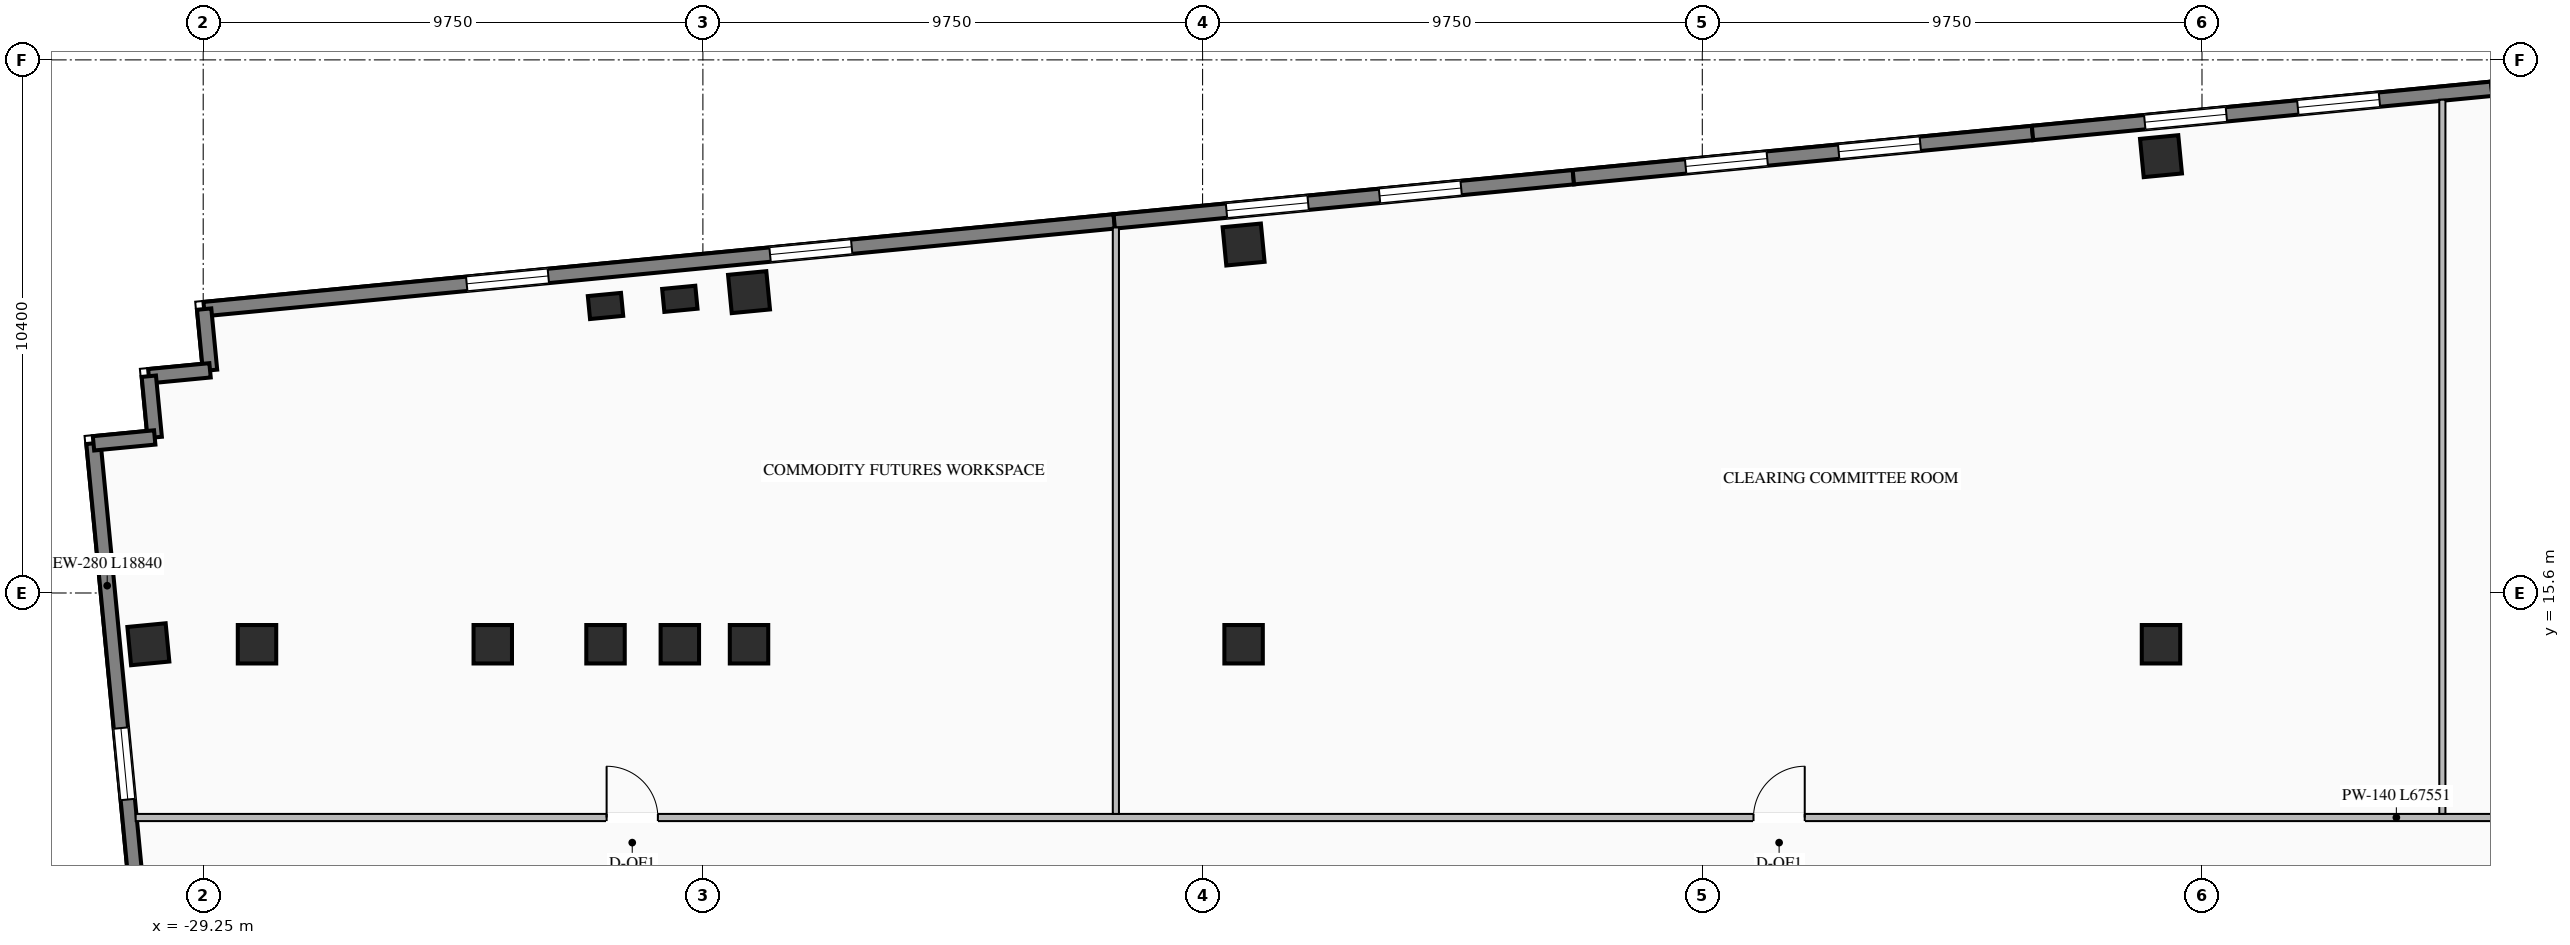
"""IFC4 building model, lengths in metres.
Left out: names, types, materials, properties, quantities, classifications, styles, units other than length and angle.
Written with IfcOpenShell. Run it as: python <this file> out.ifc"""

import sys

from ifc_helpers import new_model, si_unit, direction, frame, frame_2d, origin, origin_2d, place, context, subcontext, project, spatial, rectangle, i_section, extrude, element, fill, save


model = new_model("IFC4")
c1 = context("Model", 3, precision=1e-05, world=origin(), true_north=direction((0.0, 1.0)))
c2 = subcontext(c1, "Body", "Model", "MODEL_VIEW")
j1 = project(units=[si_unit("LENGTHUNIT", "METRE"), si_unit("PLANEANGLEUNIT", "RADIAN")], contexts=[c1])
p1 = place(None, origin())
s1 = spatial("IfcSite", under=j1, at=p1, CompositionType="ELEMENT")
p2 = place(p1, origin())
s2 = spatial("IfcBuilding", under=s1, at=p2, CompositionType="ELEMENT")
p3 = place(p2, frame((0.0, 0.0, 74.2)))
s3 = spatial("IfcBuildingStorey", under=s2, at=p3, CompositionType="ELEMENT", Elevation=74.2)
for number, where, z_axis, x_axis in (
    (1, (-21.4, 14.6, 0.0), (0.0, 0.0, 1.0), (1.0, 0.0, 0.0)),
    (2, (-19.95, 14.6, 0.0), (0.0, 0.0, 1.0), (1.0, 0.0, 0.0)),
    (3, (-18.6, 14.6, 0.0), (0.0, 0.0, 1.0), (1.0, 0.0, 0.0)),
    (4, (-8.95, 14.6, 0.0), (0.0, 0.0, 1.0), (1.0, 0.0, 0.0)),
    (5, (8.95, 14.6, 0.0), (0.0, 0.0, 1.0), (1.0, 0.0, 0.0)),
    (6, (-23.6, 14.6, 0.0), (0.0, 0.0, 1.0), (1.0, 0.0, 0.0)),
    (7, (-28.2, 14.6, 0.0), (0.0, 0.0, 1.0), (1.0, 0.0, 0.0)),
    (8, (-18.6, 21.469, 0.0), (0.0, 0.0, 1.0), (0.995, 0.096, 0.0)),
    (9, (-8.95, 22.398, 0.0), (0.0, 0.0, 1.0), (0.995, 0.096, 0.0)),
    (10, (8.95, 24.122, 0.0), (0.0, 0.0, 1.0), (0.995, 0.096, 0.0)),
    (11, (-30.32, 14.6, 0.0), (0.0, 0.0, 1.0), (0.995, 0.096, 0.0)),
):
    element("IfcColumn", number, at=place(p3, frame(where, z_axis=z_axis, x_axis=x_axis)), inside=s3, PredefinedType="COLUMN", context=c2, shape_type="SweptSolid", body=[
        extrude(i_section(OverallWidth=0.75, OverallDepth=0.75, WebThickness=0.03, FlangeThickness=0.044, at=origin_2d()), origin(), (0.0, 0.0, 1.0), 3.45),
    ])
for number, where, z_axis, x_axis in (
    (12, (-21.4, 21.199, 0.0), (0.0, 0.0, 1.0), (0.995, 0.096, 0.0)),
    (13, (-19.95, 21.339, 0.0), (0.0, 0.0, 1.0), (0.995, 0.096, 0.0)),
):
    element("IfcColumn", number, at=place(p3, frame(where, z_axis=z_axis, x_axis=x_axis)), inside=s3, PredefinedType="PILASTER", context=c2, shape_type="SweptSolid", body=[
        extrude(rectangle(XDim=0.65, YDim=0.45, at=origin_2d()), origin(), (0.0, 0.0, 1.0), 3.45),
    ])
p4 = place(p3, frame((-29.231, 21.138, 0.0), z_axis=(0.0, 0.0, 1.0), x_axis=(0.995395780835, 0.095850088663, 0.0)))
e14 = element("IfcWall", 14, at=p4, inside=s3, PredefinedType="STANDARD", context=c2, shape_type="SweptSolid", body=[
    extrude(rectangle(XDim=17.84, YDim=0.28, at=frame_2d((8.92, 0.0))), origin(), (0.0, 0.0, 1.0), 3.25),
])
p5 = place(p4, frame((5.147, 0.0, 0.76)))
e15 = element("IfcOpeningElement", 15, at=p5, cuts=e14, PredefinedType="OPENING", context=c2, shape_type="SweptSolid", body=[
    extrude(rectangle(XDim=1.6, YDim=1.95, at=frame_2d((0.8, 0.975))), frame((0.0, 0.15, 0.0), z_axis=(0.0, -1.0, 0.0), x_axis=(1.0, 0.0, 0.0)), (0.0, 0.0, 1.0), 0.3),
])
p6 = place(p4, frame((11.093, 0.0, 0.76)))
e16 = element("IfcOpeningElement", 16, at=p6, cuts=e14, PredefinedType="OPENING", context=c2, shape_type="SweptSolid", body=[
    extrude(rectangle(XDim=1.6, YDim=1.95, at=frame_2d((0.8, 0.975))), frame((0.0, 0.15, 0.0), z_axis=(0.0, -1.0, 0.0), x_axis=(1.0, 0.0, 0.0)), (0.0, 0.0, 1.0), 0.3),
])
p7 = place(p3, frame((-11.474, 22.848, 0.0), z_axis=(0.0, 0.0, 1.0), x_axis=(0.995396794462, 0.09583956164, 0.0)))
e17 = element("IfcWall", 17, at=p7, inside=s3, PredefinedType="STANDARD", context=c2, shape_type="SweptSolid", body=[
    extrude(rectangle(XDim=9.0, YDim=0.28, at=frame_2d((4.5, 0.0))), origin(), (0.0, 0.0, 1.0), 3.25),
])
p8 = place(p7, frame((2.2, 0.0, 0.76)))
e18 = element("IfcOpeningElement", 18, at=p8, cuts=e17, PredefinedType="OPENING", context=c2, shape_type="SweptSolid", body=[
    extrude(rectangle(XDim=1.6, YDim=1.95, at=frame_2d((0.8, 0.975))), frame((0.0, 0.15, 0.0), z_axis=(0.0, -1.0, 0.0), x_axis=(1.0, 0.0, 0.0)), (0.0, 0.0, 1.0), 0.3),
])
p9 = place(p7, frame((5.2, 0.0, 0.76)))
e19 = element("IfcOpeningElement", 19, at=p9, cuts=e17, PredefinedType="OPENING", context=c2, shape_type="SweptSolid", body=[
    extrude(rectangle(XDim=1.6, YDim=1.95, at=frame_2d((0.8, 0.975))), frame((0.0, 0.15, 0.0), z_axis=(0.0, -1.0, 0.0), x_axis=(1.0, 0.0, 0.0)), (0.0, 0.0, 1.0), 0.3),
])
p10 = place(p3, frame((-2.515, 23.711, 0.0), z_axis=(0.0, 0.0, 1.0), x_axis=(0.995397043619, 0.095836973841, 0.0)))
e20 = element("IfcWall", 20, at=p10, inside=s3, PredefinedType="STANDARD", context=c2, shape_type="SweptSolid", body=[
    extrude(rectangle(XDim=9.0, YDim=0.28, at=frame_2d((4.5, 0.0))), origin(), (0.0, 0.0, 1.0), 3.25),
])
p11 = place(p10, frame((2.2, 0.0, 0.76)))
e21 = element("IfcOpeningElement", 21, at=p11, cuts=e20, PredefinedType="OPENING", context=c2, shape_type="SweptSolid", body=[
    extrude(rectangle(XDim=1.6, YDim=1.95, at=frame_2d((0.8, 0.975))), frame((0.0, 0.15, 0.0), z_axis=(0.0, -1.0, 0.0), x_axis=(1.0, 0.0, 0.0)), (0.0, 0.0, 1.0), 0.3),
])
p12 = place(p10, frame((5.2, 0.0, 0.76)))
e22 = element("IfcOpeningElement", 22, at=p12, cuts=e20, PredefinedType="OPENING", context=c2, shape_type="SweptSolid", body=[
    extrude(rectangle(XDim=1.6, YDim=1.95, at=frame_2d((0.8, 0.975))), frame((0.0, 0.15, 0.0), z_axis=(0.0, -1.0, 0.0), x_axis=(1.0, 0.0, 0.0)), (0.0, 0.0, 1.0), 0.3),
])
p13 = place(p3, frame((6.444, 24.573, 0.0), z_axis=(0.0, 0.0, 1.0), x_axis=(0.995396794462, 0.09583956164, 0.0)))
e23 = element("IfcWall", 23, at=p13, inside=s3, PredefinedType="STANDARD", context=c2, shape_type="SweptSolid", body=[
    extrude(rectangle(XDim=9.0, YDim=0.28, at=frame_2d((4.5, 0.0))), origin(), (0.0, 0.0, 1.0), 3.25),
])
p14 = place(p13, frame((2.2, 0.0, 0.76)))
e24 = element("IfcOpeningElement", 24, at=p14, cuts=e23, PredefinedType="OPENING", context=c2, shape_type="SweptSolid", body=[
    extrude(rectangle(XDim=1.6, YDim=1.95, at=frame_2d((0.8, 0.975))), frame((0.0, 0.15, 0.0), z_axis=(0.0, -1.0, 0.0), x_axis=(1.0, 0.0, 0.0)), (0.0, 0.0, 1.0), 0.3),
])
p15 = place(p13, frame((5.2, 0.0, 0.76)))
e25 = element("IfcOpeningElement", 25, at=p15, cuts=e23, PredefinedType="OPENING", context=c2, shape_type="SweptSolid", body=[
    extrude(rectangle(XDim=1.6, YDim=1.95, at=frame_2d((0.8, 0.975))), frame((0.0, 0.15, 0.0), z_axis=(0.0, -1.0, 0.0), x_axis=(1.0, 0.0, 0.0)), (0.0, 0.0, 1.0), 0.3),
])
p16 = place(p3, frame((-29.585, -0.234, 0.0), z_axis=(0.0, 0.0, 1.0), x_axis=(-0.095841297881, 0.99539662729, 0.0)))
e26 = element("IfcWall", 26, at=p16, inside=s3, PredefinedType="STANDARD", context=c2, shape_type="SweptSolid", body=[
    extrude(rectangle(XDim=18.84, YDim=0.28, at=frame_2d((9.42, 0.0))), origin(), (0.0, 0.0, 1.0), 3.25),
])
p17 = place(p16, frame((5.58, 0.0, 0.76)))
e27 = element("IfcOpeningElement", 27, at=p17, cuts=e26, PredefinedType="OPENING", context=c2, shape_type="SweptSolid", body=[
    extrude(rectangle(XDim=1.4, YDim=1.95, at=frame_2d((0.7, 0.975))), frame((0.0, 0.15, 0.0), z_axis=(0.0, -1.0, 0.0), x_axis=(1.0, 0.0, 0.0)), (0.0, 0.0, 1.0), 0.3),
])
p18 = place(p16, frame((11.86, 0.0, 0.76)))
e28 = element("IfcOpeningElement", 28, at=p18, cuts=e26, PredefinedType="OPENING", context=c2, shape_type="SweptSolid", body=[
    extrude(rectangle(XDim=1.4, YDim=1.95, at=frame_2d((0.7, 0.975))), frame((0.0, 0.15, 0.0), z_axis=(0.0, -1.0, 0.0), x_axis=(1.0, 0.0, 0.0)), (0.0, 0.0, 1.0), 0.3),
])
for number, where, z_axis, x_axis in (
    (29, (-29.231, 21.138, 0.0), (0.0, 0.0, 1.0), (0.096, -0.995, 0.0)),
    (30, (-29.116, 19.944, 0.0), (0.0, 0.0, 1.0), (-0.995, -0.096, 0.0)),
):
    element("IfcWall", number, at=place(p3, frame(where, z_axis=z_axis, x_axis=x_axis)), inside=s3, PredefinedType="STANDARD", context=c2, shape_type="SweptSolid", body=[
        extrude(rectangle(XDim=1.2, YDim=0.28, at=frame_2d((0.6, 0.0))), origin(), (0.0, 0.0, 1.0), 3.25),
    ])
for number, where, z_axis, x_axis in (
    (31, (-30.311, 19.829, 0.0), (0.0, 0.0, 1.0), (0.096, -0.995, 0.0)),
    (32, (-30.196, 18.635, 0.0), (0.0, 0.0, 1.0), (-0.995, -0.096, 0.0)),
):
    element("IfcWall", number, at=place(p3, frame(where, z_axis=z_axis, x_axis=x_axis)), inside=s3, PredefinedType="STANDARD", context=c2, shape_type="SweptSolid", body=[
        extrude(rectangle(XDim=1.2, YDim=0.28, at=frame_2d((0.6, 0.0))), origin(), (0.0, 0.0, 1.0), 3.25),
    ])
p19 = place(p3, frame((-30.567, 11.22, 0.0), z_axis=(0.0, 0.0, 1.0), x_axis=(1.0, 0.0, 0.0)))
e33 = element("IfcWall", 33, at=p19, inside=s3, PredefinedType="STANDARD", context=c2, shape_type="SweptSolid", body=[
    extrude(rectangle(XDim=67.551, YDim=0.14, at=frame_2d((33.775, 0.0))), origin(), (0.0, 0.0, 1.0), 3.25),
])
p20 = place(p19, frame((9.188, 0.0, 0.0)))
e34 = element("IfcOpeningElement", 34, at=p20, cuts=e33, PredefinedType="OPENING", context=c2, shape_type="SweptSolid", body=[
    extrude(rectangle(XDim=1.0, YDim=2.08, at=frame_2d((0.5, 1.04))), frame((0.0, 0.08, 0.0), z_axis=(0.0, -1.0, 0.0), x_axis=(1.0, 0.0, 0.0)), (0.0, 0.0, 1.0), 0.16),
])
p21 = place(p19, frame((31.566, 0.0, 0.0)))
e35 = element("IfcOpeningElement", 35, at=p21, cuts=e33, PredefinedType="OPENING", context=c2, shape_type="SweptSolid", body=[
    extrude(rectangle(XDim=1.0, YDim=2.08, at=frame_2d((0.5, 1.04))), frame((0.0, 0.08, 0.0), z_axis=(0.0, -1.0, 0.0), x_axis=(1.0, 0.0, 0.0)), (0.0, 0.0, 1.0), 0.16),
])
p22 = place(p19, frame((55.653, 0.0, 0.0)))
e36 = element("IfcOpeningElement", 36, at=p22, cuts=e33, PredefinedType="OPENING", context=c2, shape_type="SweptSolid", body=[
    extrude(rectangle(XDim=1.0, YDim=2.08, at=frame_2d((0.5, 1.04))), frame((0.0, 0.08, 0.0), z_axis=(0.0, -1.0, 0.0), x_axis=(1.0, 0.0, 0.0)), (0.0, 0.0, 1.0), 0.16),
])
p23 = place(p3, frame((-11.442, 11.29, 0.0), z_axis=(0.0, 0.0, 1.0), x_axis=(0.0, 1.0, 0.0)))
e37 = element("IfcWall", 37, at=p23, inside=s3, PredefinedType="STANDARD", context=c2, shape_type="SweptSolid", body=[
    extrude(rectangle(XDim=11.441, YDim=0.12, at=frame_2d((5.72, 0.0))), origin(), (0.0, 0.0, 1.0), 3.25),
])
p24 = place(p3, frame((14.44, 11.29, 0.0), z_axis=(0.0, 0.0, 1.0), x_axis=(0.0, 1.0, 0.0)))
e38 = element("IfcWall", 38, at=p24, inside=s3, PredefinedType="STANDARD", context=c2, shape_type="SweptSolid", body=[
    extrude(rectangle(XDim=13.933, YDim=0.12, at=frame_2d((6.966, 0.0))), origin(), (0.0, 0.0, 1.0), 3.25),
])
p25 = place(p5, origin())
e39 = element("IfcWindow", 39, at=p25, inside=s3, PartitioningType="SINGLE_PANEL", PredefinedType="WINDOW", context=c2, shape_type="SweptSolid", body=[
    extrude(rectangle(XDim=1.6, YDim=1.95, at=frame_2d((0.8, 0.975))), frame((0.0, 0.03, 0.0), z_axis=(0.0, -1.0, 0.0), x_axis=(1.0, 0.0, 0.0)), (0.0, 0.0, 1.0), 0.06),
])
fill(e15, e39)
p26 = place(p6, origin())
e40 = element("IfcWindow", 40, at=p26, inside=s3, PartitioningType="SINGLE_PANEL", PredefinedType="WINDOW", context=c2, shape_type="SweptSolid", body=[
    extrude(rectangle(XDim=1.6, YDim=1.95, at=frame_2d((0.8, 0.975))), frame((0.0, 0.03, 0.0), z_axis=(0.0, -1.0, 0.0), x_axis=(1.0, 0.0, 0.0)), (0.0, 0.0, 1.0), 0.06),
])
fill(e16, e40)
p27 = place(p8, origin())
e41 = element("IfcWindow", 41, at=p27, inside=s3, PartitioningType="SINGLE_PANEL", PredefinedType="WINDOW", context=c2, shape_type="SweptSolid", body=[
    extrude(rectangle(XDim=1.6, YDim=1.95, at=frame_2d((0.8, 0.975))), frame((0.0, 0.03, 0.0), z_axis=(0.0, -1.0, 0.0), x_axis=(1.0, 0.0, 0.0)), (0.0, 0.0, 1.0), 0.06),
])
fill(e18, e41)
p28 = place(p9, origin())
e42 = element("IfcWindow", 42, at=p28, inside=s3, PartitioningType="SINGLE_PANEL", PredefinedType="WINDOW", context=c2, shape_type="SweptSolid", body=[
    extrude(rectangle(XDim=1.6, YDim=1.95, at=frame_2d((0.8, 0.975))), frame((0.0, 0.03, 0.0), z_axis=(0.0, -1.0, 0.0), x_axis=(1.0, 0.0, 0.0)), (0.0, 0.0, 1.0), 0.06),
])
fill(e19, e42)
p29 = place(p11, origin())
e43 = element("IfcWindow", 43, at=p29, inside=s3, PartitioningType="SINGLE_PANEL", PredefinedType="WINDOW", context=c2, shape_type="SweptSolid", body=[
    extrude(rectangle(XDim=1.6, YDim=1.95, at=frame_2d((0.8, 0.975))), frame((0.0, 0.03, 0.0), z_axis=(0.0, -1.0, 0.0), x_axis=(1.0, 0.0, 0.0)), (0.0, 0.0, 1.0), 0.06),
])
fill(e21, e43)
p30 = place(p12, origin())
e44 = element("IfcWindow", 44, at=p30, inside=s3, PartitioningType="SINGLE_PANEL", PredefinedType="WINDOW", context=c2, shape_type="SweptSolid", body=[
    extrude(rectangle(XDim=1.6, YDim=1.95, at=frame_2d((0.8, 0.975))), frame((0.0, 0.03, 0.0), z_axis=(0.0, -1.0, 0.0), x_axis=(1.0, 0.0, 0.0)), (0.0, 0.0, 1.0), 0.06),
])
fill(e22, e44)
p31 = place(p14, origin())
e45 = element("IfcWindow", 45, at=p31, inside=s3, PartitioningType="SINGLE_PANEL", PredefinedType="WINDOW", context=c2, shape_type="SweptSolid", body=[
    extrude(rectangle(XDim=1.6, YDim=1.95, at=frame_2d((0.8, 0.975))), frame((0.0, 0.03, 0.0), z_axis=(0.0, -1.0, 0.0), x_axis=(1.0, 0.0, 0.0)), (0.0, 0.0, 1.0), 0.06),
])
fill(e24, e45)
p32 = place(p15, origin())
e46 = element("IfcWindow", 46, at=p32, inside=s3, PartitioningType="SINGLE_PANEL", PredefinedType="WINDOW", context=c2, shape_type="SweptSolid", body=[
    extrude(rectangle(XDim=1.6, YDim=1.95, at=frame_2d((0.8, 0.975))), frame((0.0, 0.03, 0.0), z_axis=(0.0, -1.0, 0.0), x_axis=(1.0, 0.0, 0.0)), (0.0, 0.0, 1.0), 0.06),
])
fill(e25, e46)
p33 = place(p18, origin())
e47 = element("IfcWindow", 47, at=p33, inside=s3, PartitioningType="SINGLE_PANEL", PredefinedType="WINDOW", context=c2, shape_type="SweptSolid", body=[
    extrude(rectangle(XDim=1.4, YDim=1.95, at=frame_2d((0.7, 0.975))), frame((0.0, 0.03, 0.0), z_axis=(0.0, -1.0, 0.0), x_axis=(1.0, 0.0, 0.0)), (0.0, 0.0, 1.0), 0.06),
])
fill(e28, e47)
p34 = place(p20, origin())
e48 = element("IfcDoor", 48, at=p34, inside=s3, OperationType="SINGLE_SWING_LEFT", PredefinedType="DOOR", context=c2, shape_type="SweptSolid", body=[
    extrude(rectangle(XDim=1.0, YDim=2.08, at=frame_2d((0.5, 1.04))), frame((0.0, 0.025, 0.0), z_axis=(0.0, -1.0, 0.0), x_axis=(1.0, 0.0, 0.0)), (0.0, 0.0, 1.0), 0.05),
])
fill(e34, e48)
p35 = place(p21, origin())
e49 = element("IfcDoor", 49, at=p35, inside=s3, OperationType="SINGLE_SWING_RIGHT", PredefinedType="DOOR", context=c2, shape_type="SweptSolid", body=[
    extrude(rectangle(XDim=1.0, YDim=2.08, at=frame_2d((0.5, 1.04))), frame((0.0, 0.025, 0.0), z_axis=(0.0, -1.0, 0.0), x_axis=(1.0, 0.0, 0.0)), (0.0, 0.0, 1.0), 0.05),
])
fill(e35, e49)
save(model, sys.argv[1])
